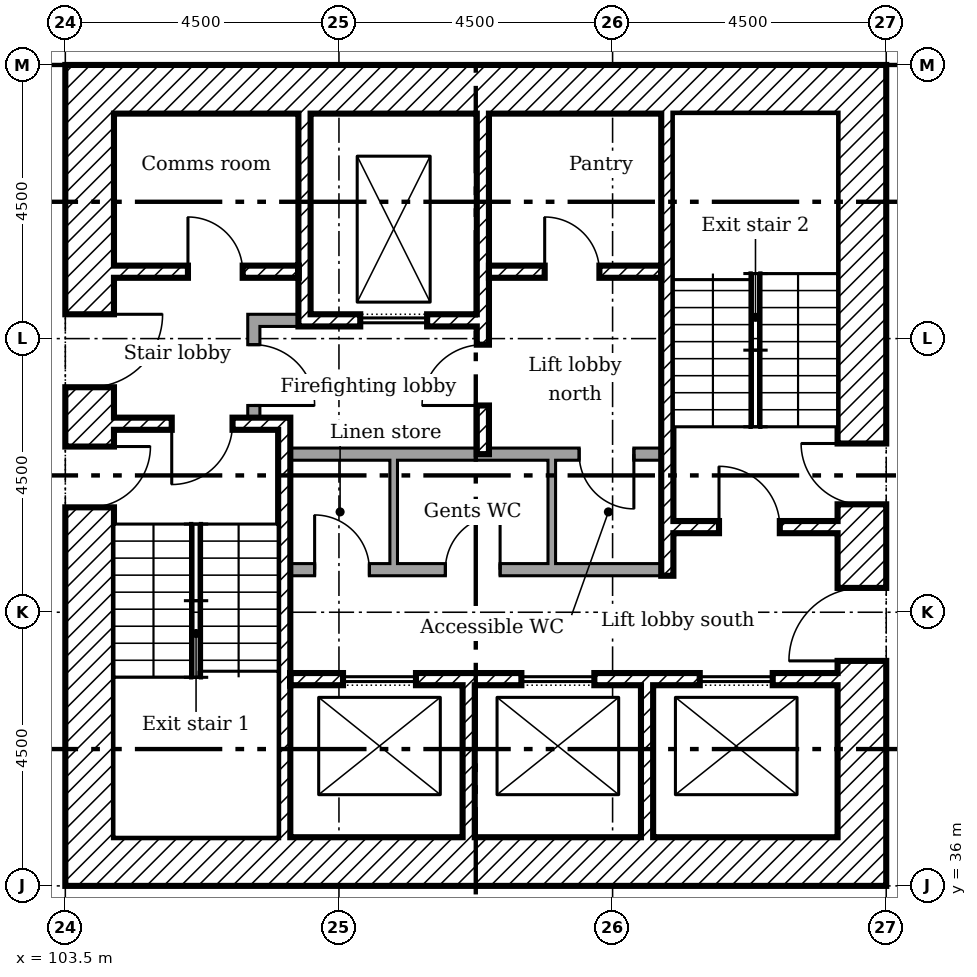
"""IFC4 building model, lengths in metres.
Left out: names, types, materials, properties, quantities, classifications, styles, units other than length and angle.
Written with IfcOpenShell. Run it as: python <this file> out.ifc"""

import sys

from ifc_helpers import new_model, si_unit, direction, frame, frame_2d, origin, place, context, subcontext, project, spatial, rectangle, extrude, element, fill, save


model = new_model("IFC4")
c1 = context("Model", 3, precision=1e-05, world=origin(), true_north=direction((0.0, 1.0)))
c2 = subcontext(c1, "Body", "Model", "MODEL_VIEW")
j1 = project(units=[si_unit("LENGTHUNIT", "METRE"), si_unit("PLANEANGLEUNIT", "RADIAN")], contexts=[c1])
p1 = place(None, origin())
s1 = spatial("IfcSite", under=j1, at=p1, CompositionType="ELEMENT")
p2 = place(p1, origin())
s2 = spatial("IfcBuilding", under=s1, at=p2, CompositionType="ELEMENT")
p3 = place(p2, frame((0.0, 0.0, 72.6)))
s3 = spatial("IfcBuildingStorey", under=s2, at=p3, CompositionType="ELEMENT", Elevation=72.6)
p4 = place(p3, frame((116.6, 36.0, 0.0), z_axis=(0.0, 0.0, 1.0), x_axis=(0.0, 1.0, 0.0)))
e1 = element("IfcWall", 1, at=p4, inside=s3, PredefinedType="SHEAR", context=c2, shape_type="SweptSolid", body=[
    extrude(rectangle(XDim=13.5, YDim=0.8, at=frame_2d((6.75, 0.0))), origin(), (0.0, 0.0, 1.0), 3.35),
])
p5 = place(p4, frame((3.7, 0.0, 0.0)))
e2 = element("IfcOpeningElement", 2, at=p5, cuts=e1, PredefinedType="OPENING", context=c2, shape_type="SweptSolid", body=[
    extrude(rectangle(XDim=1.2, YDim=2.1, at=frame_2d((0.6, 1.05))), frame((0.0, 0.41, 0.0), z_axis=(0.0, -1.0, 0.0), x_axis=(1.0, 0.0, 0.0)), (0.0, 0.0, 1.0), 0.82),
])
p6 = place(p4, frame((6.275, 0.0, 0.0)))
e3 = element("IfcOpeningElement", 3, at=p6, cuts=e1, PredefinedType="OPENING", context=c2, shape_type="SweptSolid", body=[
    extrude(rectangle(XDim=1.0, YDim=2.1, at=frame_2d((0.5, 1.05))), frame((0.0, 0.41, 0.0), z_axis=(0.0, -1.0, 0.0), x_axis=(1.0, 0.0, 0.0)), (0.0, 0.0, 1.0), 0.82),
])
for number, where in (
    (4, (104.3, 49.1, 0.0)),
    (5, (104.3, 36.4, 0.0)),
):
    element("IfcWall", number, at=place(p3, frame(where)), inside=s3, PredefinedType="SHEAR", context=c2, shape_type="SweptSolid", body=[
        extrude(rectangle(XDim=11.9, YDim=0.8, at=frame_2d((5.95, 0.0))), origin(), (0.0, 0.0, 1.0), 3.35),
    ])
p7 = place(p3, frame((103.9, 36.0, 0.0), z_axis=(0.0, 0.0, 1.0), x_axis=(0.0, 1.0, 0.0)))
e6 = element("IfcWall", 6, at=p7, inside=s3, PredefinedType="SHEAR", context=c2, shape_type="SweptSolid", body=[
    extrude(rectangle(XDim=13.5, YDim=0.8, at=frame_2d((6.75, 0.0))), origin(), (0.0, 0.0, 1.0), 3.35),
])
p8 = place(p7, frame((8.2, 0.0, 0.0)))
e7 = element("IfcOpeningElement", 7, at=p8, cuts=e6, PredefinedType="OPENING", context=c2, shape_type="SweptSolid", body=[
    extrude(rectangle(XDim=1.2, YDim=2.1, at=frame_2d((0.6, 1.05))), frame((0.0, 0.41, 0.0), z_axis=(0.0, -1.0, 0.0), x_axis=(1.0, 0.0, 0.0)), (0.0, 0.0, 1.0), 0.82),
])
p9 = place(p7, frame((6.225, 0.0, 0.0)))
e8 = element("IfcOpeningElement", 8, at=p9, cuts=e6, PredefinedType="OPENING", context=c2, shape_type="SweptSolid", body=[
    extrude(rectangle(XDim=1.0, YDim=2.1, at=frame_2d((0.5, 1.05))), frame((0.0, 0.41, 0.0), z_axis=(0.0, -1.0, 0.0), x_axis=(1.0, 0.0, 0.0)), (0.0, 0.0, 1.0), 0.82),
])
p10 = place(p3, frame((107.433, 48.7, 0.0), z_axis=(0.0, 0.0, 1.0), x_axis=(0.0, -1.0, 0.0)))
e9 = element("IfcWall", 9, at=p10, inside=s3, PredefinedType="SHEAR", context=c2, shape_type="SweptSolid", body=[
    extrude(rectangle(XDim=3.5, YDim=0.2, at=frame_2d((1.75, 0.0))), origin(), (0.0, 0.0, 1.0), 3.35),
])
p11 = place(p3, frame((110.367, 48.7, 0.0), z_axis=(0.0, 0.0, 1.0), x_axis=(0.0, -1.0, 0.0)))
e10 = element("IfcWall", 10, at=p11, inside=s3, PredefinedType="SHEAR", context=c2, shape_type="SweptSolid", body=[
    extrude(rectangle(XDim=5.6, YDim=0.2, at=frame_2d((2.8, 0.0))), origin(), (0.0, 0.0, 1.0), 3.35),
])
p12 = place(p11, frame((3.8, 0.0, 0.0)))
e11 = element("IfcOpeningElement", 11, at=p12, cuts=e10, PredefinedType="OPENING", context=c2, shape_type="SweptSolid", body=[
    extrude(rectangle(XDim=1.0, YDim=2.1, at=frame_2d((0.5, 1.05))), frame((0.0, 0.11, 0.0), z_axis=(0.0, -1.0, 0.0), x_axis=(1.0, 0.0, 0.0)), (0.0, 0.0, 1.0), 0.22),
])
for number, where, z_axis, x_axis in (
    (12, (110.133, 36.8, 0.0), (0.0, 0.0, 1.0), (0.0, 1.0, 0.0)),
    (13, (113.067, 36.8, 0.0), (0.0, 0.0, 1.0), (0.0, 1.0, 0.0)),
):
    element("IfcWall", number, at=place(p3, frame(where, z_axis=z_axis, x_axis=x_axis)), inside=s3, PredefinedType="SHEAR", context=c2, shape_type="SweptSolid", body=[
        extrude(rectangle(XDim=2.5, YDim=0.2, at=frame_2d((1.25, 0.0))), origin(), (0.0, 0.0, 1.0), 3.35),
    ])
p13 = place(p3, frame((106.5, 45.3, 0.0)))
e14 = element("IfcWall", 14, at=p13, inside=s3, PredefinedType="PARTITIONING", context=c2, shape_type="SweptSolid", body=[
    extrude(rectangle(XDim=0.833, YDim=0.2, at=frame_2d((0.417, 0.0))), origin(), (0.0, 0.0, 1.0), 3.35),
])
p14 = place(p3, frame((106.6, 43.7, 0.0), z_axis=(0.0, 0.0, 1.0), x_axis=(0.0, 1.0, 0.0)))
e15 = element("IfcWall", 15, at=p14, inside=s3, PredefinedType="PARTITIONING", context=c2, shape_type="SweptSolid", body=[
    extrude(rectangle(XDim=1.5, YDim=0.2, at=frame_2d((0.75, 0.0))), origin(), (0.0, 0.0, 1.0), 3.35),
])
p15 = place(p14, frame((0.2, 0.0, 0.0)))
e16 = element("IfcOpeningElement", 16, at=p15, cuts=e15, PredefinedType="OPENING", context=c2, shape_type="SweptSolid", body=[
    extrude(rectangle(XDim=1.0, YDim=2.1, at=frame_2d((0.5, 1.05))), frame((0.0, 0.11, 0.0), z_axis=(0.0, -1.0, 0.0), x_axis=(1.0, 0.0, 0.0)), (0.0, 0.0, 1.0), 0.22),
])
p16 = place(p3, frame((104.3, 46.1, 0.0)))
e17 = element("IfcWall", 17, at=p16, inside=s3, PredefinedType="SHEAR", context=c2, shape_type="SweptSolid", body=[
    extrude(rectangle(XDim=3.033, YDim=0.2, at=frame_2d((1.517, 0.0))), origin(), (0.0, 0.0, 1.0), 3.35),
])
p17 = place(p16, frame((1.217, 0.0, 0.0)))
e18 = element("IfcOpeningElement", 18, at=p17, cuts=e17, PredefinedType="OPENING", context=c2, shape_type="SweptSolid", body=[
    extrude(rectangle(XDim=0.9, YDim=2.1, at=frame_2d((0.45, 1.05))), frame((0.0, 0.11, 0.0), z_axis=(0.0, -1.0, 0.0), x_axis=(1.0, 0.0, 0.0)), (0.0, 0.0, 1.0), 0.22),
])
p18 = place(p3, frame((110.467, 46.1, 0.0)))
e19 = element("IfcWall", 19, at=p18, inside=s3, PredefinedType="SHEAR", context=c2, shape_type="SweptSolid", body=[
    extrude(rectangle(XDim=2.833, YDim=0.2, at=frame_2d((1.417, 0.0))), origin(), (0.0, 0.0, 1.0), 3.35),
])
p19 = place(p18, frame((0.917, 0.0, 0.0)))
e20 = element("IfcOpeningElement", 20, at=p19, cuts=e19, PredefinedType="OPENING", context=c2, shape_type="SweptSolid", body=[
    extrude(rectangle(XDim=0.9, YDim=2.1, at=frame_2d((0.45, 1.05))), frame((0.0, 0.11, 0.0), z_axis=(0.0, -1.0, 0.0), x_axis=(1.0, 0.0, 0.0)), (0.0, 0.0, 1.0), 0.22),
])
p20 = place(p3, frame((107.533, 45.3, 0.0)))
e21 = element("IfcWall", 21, at=p20, inside=s3, PredefinedType="SHEAR", context=c2, shape_type="SweptSolid", body=[
    extrude(rectangle(XDim=2.733, YDim=0.2, at=frame_2d((1.367, 0.0))), origin(), (0.0, 0.0, 1.0), 3.35),
])
p21 = place(p20, frame((0.817, 0.0, 0.0)))
e22 = element("IfcOpeningElement", 22, at=p21, cuts=e21, PredefinedType="OPENING", context=c2, shape_type="SweptSolid", body=[
    extrude(rectangle(XDim=1.1, YDim=2.1, at=frame_2d((0.55, 1.05))), frame((0.0, 0.11, 0.0), z_axis=(0.0, -1.0, 0.0), x_axis=(1.0, 0.0, 0.0)), (0.0, 0.0, 1.0), 0.22),
])
p22 = place(p3, frame((107.2, 39.4, 0.0)))
e23 = element("IfcWall", 23, at=p22, inside=s3, PredefinedType="SHEAR", context=c2, shape_type="SweptSolid", body=[
    extrude(rectangle(XDim=9.0, YDim=0.2, at=frame_2d((4.5, 0.0))), origin(), (0.0, 0.0, 1.0), 3.35),
])
p23 = place(p22, frame((0.867, 0.0, 0.0)))
e24 = element("IfcOpeningElement", 24, at=p23, cuts=e23, PredefinedType="OPENING", context=c2, shape_type="SweptSolid", body=[
    extrude(rectangle(XDim=1.2, YDim=2.1, at=frame_2d((0.6, 1.05))), frame((0.0, 0.11, 0.0), z_axis=(0.0, -1.0, 0.0), x_axis=(1.0, 0.0, 0.0)), (0.0, 0.0, 1.0), 0.22),
])
p24 = place(p22, frame((3.8, 0.0, 0.0)))
e25 = element("IfcOpeningElement", 25, at=p24, cuts=e23, PredefinedType="OPENING", context=c2, shape_type="SweptSolid", body=[
    extrude(rectangle(XDim=1.2, YDim=2.1, at=frame_2d((0.6, 1.05))), frame((0.0, 0.11, 0.0), z_axis=(0.0, -1.0, 0.0), x_axis=(1.0, 0.0, 0.0)), (0.0, 0.0, 1.0), 0.22),
])
p25 = place(p22, frame((6.733, 0.0, 0.0)))
e26 = element("IfcOpeningElement", 26, at=p25, cuts=e23, PredefinedType="OPENING", context=c2, shape_type="SweptSolid", body=[
    extrude(rectangle(XDim=1.2, YDim=2.1, at=frame_2d((0.6, 1.05))), frame((0.0, 0.11, 0.0), z_axis=(0.0, -1.0, 0.0), x_axis=(1.0, 0.0, 0.0)), (0.0, 0.0, 1.0), 0.22),
])
p26 = place(p3, frame((107.1, 36.8, 0.0), z_axis=(0.0, 0.0, 1.0), x_axis=(0.0, 1.0, 0.0)))
e27 = element("IfcWall", 27, at=p26, inside=s3, PredefinedType="SHEAR", context=c2, shape_type="SweptSolid", body=[
    extrude(rectangle(XDim=6.9, YDim=0.2, at=frame_2d((3.45, 0.0))), origin(), (0.0, 0.0, 1.0), 3.35),
])
p27 = place(p3, frame((104.3, 43.6, 0.0)))
e28 = element("IfcWall", 28, at=p27, inside=s3, PredefinedType="SHEAR", context=c2, shape_type="SweptSolid", body=[
    extrude(rectangle(XDim=2.7, YDim=0.2, at=frame_2d((1.35, 0.0))), origin(), (0.0, 0.0, 1.0), 3.35),
])
p28 = place(p27, frame((0.95, 0.0, 0.0)))
e29 = element("IfcOpeningElement", 29, at=p28, cuts=e28, PredefinedType="OPENING", context=c2, shape_type="SweptSolid", body=[
    extrude(rectangle(XDim=1.0, YDim=2.1, at=frame_2d((0.5, 1.05))), frame((0.0, 0.11, 0.0), z_axis=(0.0, -1.0, 0.0), x_axis=(1.0, 0.0, 0.0)), (0.0, 0.0, 1.0), 0.22),
])
p29 = place(p3, frame((113.5, 41.9, 0.0)))
e30 = element("IfcWall", 30, at=p29, inside=s3, PredefinedType="SHEAR", context=c2, shape_type="SweptSolid", body=[
    extrude(rectangle(XDim=2.7, YDim=0.2, at=frame_2d((1.35, 0.0))), origin(), (0.0, 0.0, 1.0), 3.35),
])
p30 = place(p29, frame((0.75, 0.0, 0.0)))
e31 = element("IfcOpeningElement", 31, at=p30, cuts=e30, PredefinedType="OPENING", context=c2, shape_type="SweptSolid", body=[
    extrude(rectangle(XDim=1.0, YDim=2.1, at=frame_2d((0.5, 1.05))), frame((0.0, 0.11, 0.0), z_axis=(0.0, -1.0, 0.0), x_axis=(1.0, 0.0, 0.0)), (0.0, 0.0, 1.0), 0.22),
])
p31 = place(p3, frame((113.4, 41.1, 0.0), z_axis=(0.0, 0.0, 1.0), x_axis=(0.0, 1.0, 0.0)))
e32 = element("IfcWall", 32, at=p31, inside=s3, PredefinedType="SHEAR", context=c2, shape_type="SweptSolid", body=[
    extrude(rectangle(XDim=7.6, YDim=0.2, at=frame_2d((3.8, 0.0))), origin(), (0.0, 0.0, 1.0), 3.35),
])
p32 = place(p3, frame((107.2, 43.1, 0.0)))
e33 = element("IfcWall", 33, at=p32, inside=s3, PredefinedType="PARTITIONING", context=c2, shape_type="SweptSolid", body=[
    extrude(rectangle(XDim=6.1, YDim=0.2, at=frame_2d((3.05, 0.0))), origin(), (0.0, 0.0, 1.0), 3.35),
])
p33 = place(p32, frame((4.75, 0.0, 0.0)))
e34 = element("IfcOpeningElement", 34, at=p33, cuts=e33, PredefinedType="OPENING", context=c2, shape_type="SweptSolid", body=[
    extrude(rectangle(XDim=0.9, YDim=2.1, at=frame_2d((0.45, 1.05))), frame((0.0, 0.11, 0.0), z_axis=(0.0, -1.0, 0.0), x_axis=(1.0, 0.0, 0.0)), (0.0, 0.0, 1.0), 0.22),
])
p34 = place(p3, frame((107.2, 41.2, 0.0)))
e35 = element("IfcWall", 35, at=p34, inside=s3, PredefinedType="PARTITIONING", context=c2, shape_type="SweptSolid", body=[
    extrude(rectangle(XDim=6.1, YDim=0.2, at=frame_2d((3.05, 0.0))), origin(), (0.0, 0.0, 1.0), 3.35),
])
p35 = place(p34, frame((0.4, 0.0, 0.0)))
e36 = element("IfcOpeningElement", 36, at=p35, cuts=e35, PredefinedType="OPENING", context=c2, shape_type="SweptSolid", body=[
    extrude(rectangle(XDim=0.9, YDim=2.1, at=frame_2d((0.45, 1.05))), frame((0.0, 0.11, 0.0), z_axis=(0.0, -1.0, 0.0), x_axis=(1.0, 0.0, 0.0)), (0.0, 0.0, 1.0), 0.22),
])
p36 = place(p34, frame((2.55, 0.0, 0.0)))
e37 = element("IfcOpeningElement", 37, at=p36, cuts=e35, PredefinedType="OPENING", context=c2, shape_type="SweptSolid", body=[
    extrude(rectangle(XDim=0.9, YDim=2.1, at=frame_2d((0.45, 1.05))), frame((0.0, 0.11, 0.0), z_axis=(0.0, -1.0, 0.0), x_axis=(1.0, 0.0, 0.0)), (0.0, 0.0, 1.0), 0.22),
])
for number, where, z_axis, x_axis in (
    (38, (108.9, 41.3, 0.0), (0.0, 0.0, 1.0), (0.0, 1.0, 0.0)),
    (39, (111.5, 41.3, 0.0), (0.0, 0.0, 1.0), (0.0, 1.0, 0.0)),
):
    element("IfcWall", number, at=place(p3, frame(where, z_axis=z_axis, x_axis=x_axis)), inside=s3, PredefinedType="PARTITIONING", context=c2, shape_type="SweptSolid", body=[
        extrude(rectangle(XDim=1.7, YDim=0.125, at=frame_2d((0.85, 0.0))), origin(), (0.0, 0.0, 1.0), 3.35),
    ])
p37 = place(p8, frame((1.2, 0.0, 0.0), x_axis=(-1.0, 0.0, 0.0)))
e40 = element("IfcDoor", 40, at=p37, inside=s3, OperationType="SINGLE_SWING_RIGHT", PredefinedType="DOOR", context=c2, shape_type="SweptSolid", body=[
    extrude(rectangle(XDim=1.2, YDim=2.1, at=frame_2d((0.6, 1.05))), frame((0.0, 0.025, 0.0), z_axis=(0.0, -1.0, 0.0), x_axis=(1.0, 0.0, 0.0)), (0.0, 0.0, 1.0), 0.05),
])
fill(e7, e40)
p38 = place(p5, origin())
e41 = element("IfcDoor", 41, at=p38, inside=s3, OperationType="SINGLE_SWING_RIGHT", PredefinedType="DOOR", context=c2, shape_type="SweptSolid", body=[
    extrude(rectangle(XDim=1.2, YDim=2.1, at=frame_2d((0.6, 1.05))), frame((0.0, 0.025, 0.0), z_axis=(0.0, -1.0, 0.0), x_axis=(1.0, 0.0, 0.0)), (0.0, 0.0, 1.0), 0.05),
])
fill(e2, e41)
p39 = place(p28, frame((1.0, 0.0, 0.0), x_axis=(-1.0, 0.0, 0.0)))
e42 = element("IfcDoor", 42, at=p39, inside=s3, OperationType="SINGLE_SWING_LEFT", PredefinedType="DOOR", context=c2, shape_type="SweptSolid", body=[
    extrude(rectangle(XDim=1.0, YDim=2.1, at=frame_2d((0.5, 1.05))), frame((0.0, 0.025, 0.0), z_axis=(0.0, -1.0, 0.0), x_axis=(1.0, 0.0, 0.0)), (0.0, 0.0, 1.0), 0.05),
])
fill(e29, e42)
p40 = place(p9, frame((1.0, 0.0, 0.0), x_axis=(-1.0, 0.0, 0.0)))
e43 = element("IfcDoor", 43, at=p40, inside=s3, OperationType="SINGLE_SWING_RIGHT", PredefinedType="DOOR", context=c2, shape_type="SweptSolid", body=[
    extrude(rectangle(XDim=1.0, YDim=2.1, at=frame_2d((0.5, 1.05))), frame((0.0, 0.025, 0.0), z_axis=(0.0, -1.0, 0.0), x_axis=(1.0, 0.0, 0.0)), (0.0, 0.0, 1.0), 0.05),
])
fill(e8, e43)
p41 = place(p30, origin())
e44 = element("IfcDoor", 44, at=p41, inside=s3, OperationType="SINGLE_SWING_RIGHT", PredefinedType="DOOR", context=c2, shape_type="SweptSolid", body=[
    extrude(rectangle(XDim=1.0, YDim=2.1, at=frame_2d((0.5, 1.05))), frame((0.0, 0.025, 0.0), z_axis=(0.0, -1.0, 0.0), x_axis=(1.0, 0.0, 0.0)), (0.0, 0.0, 1.0), 0.05),
])
fill(e31, e44)
p42 = place(p6, origin())
e45 = element("IfcDoor", 45, at=p42, inside=s3, OperationType="SINGLE_SWING_LEFT", PredefinedType="DOOR", context=c2, shape_type="SweptSolid", body=[
    extrude(rectangle(XDim=1.0, YDim=2.1, at=frame_2d((0.5, 1.05))), frame((0.0, 0.025, 0.0), z_axis=(0.0, -1.0, 0.0), x_axis=(1.0, 0.0, 0.0)), (0.0, 0.0, 1.0), 0.05),
])
fill(e3, e45)
p43 = place(p12, frame((1.0, 0.0, 0.0), x_axis=(-1.0, 0.0, 0.0)))
e46 = element("IfcDoor", 46, at=p43, inside=s3, OperationType="SINGLE_SWING_RIGHT", PredefinedType="DOOR", context=c2, shape_type="SweptSolid", body=[
    extrude(rectangle(XDim=1.0, YDim=2.1, at=frame_2d((0.5, 1.05))), frame((0.0, 0.025, 0.0), z_axis=(0.0, -1.0, 0.0), x_axis=(1.0, 0.0, 0.0)), (0.0, 0.0, 1.0), 0.05),
])
fill(e11, e46)
p44 = place(p15, frame((1.0, 0.0, 0.0), x_axis=(-1.0, 0.0, 0.0)))
e47 = element("IfcDoor", 47, at=p44, inside=s3, OperationType="SINGLE_SWING_LEFT", PredefinedType="DOOR", context=c2, shape_type="SweptSolid", body=[
    extrude(rectangle(XDim=1.0, YDim=2.1, at=frame_2d((0.5, 1.05))), frame((0.0, 0.025, 0.0), z_axis=(0.0, -1.0, 0.0), x_axis=(1.0, 0.0, 0.0)), (0.0, 0.0, 1.0), 0.05),
])
fill(e16, e47)
p45 = place(p17, origin())
e48 = element("IfcDoor", 48, at=p45, inside=s3, OperationType="SINGLE_SWING_RIGHT", PredefinedType="DOOR", context=c2, shape_type="SweptSolid", body=[
    extrude(rectangle(XDim=0.9, YDim=2.1, at=frame_2d((0.45, 1.05))), frame((0.0, 0.025, 0.0), z_axis=(0.0, -1.0, 0.0), x_axis=(1.0, 0.0, 0.0)), (0.0, 0.0, 1.0), 0.05),
])
fill(e18, e48)
p46 = place(p19, origin())
e49 = element("IfcDoor", 49, at=p46, inside=s3, OperationType="SINGLE_SWING_RIGHT", PredefinedType="DOOR", context=c2, shape_type="SweptSolid", body=[
    extrude(rectangle(XDim=0.9, YDim=2.1, at=frame_2d((0.45, 1.05))), frame((0.0, 0.025, 0.0), z_axis=(0.0, -1.0, 0.0), x_axis=(1.0, 0.0, 0.0)), (0.0, 0.0, 1.0), 0.05),
])
fill(e20, e49)
p47 = place(p35, origin())
e50 = element("IfcDoor", 50, at=p47, inside=s3, OperationType="SINGLE_SWING_RIGHT", PredefinedType="DOOR", context=c2, shape_type="SweptSolid", body=[
    extrude(rectangle(XDim=0.9, YDim=2.1, at=frame_2d((0.45, 1.05))), frame((0.0, 0.025, 0.0), z_axis=(0.0, -1.0, 0.0), x_axis=(1.0, 0.0, 0.0)), (0.0, 0.0, 1.0), 0.05),
])
fill(e36, e50)
p48 = place(p36, origin())
e51 = element("IfcDoor", 51, at=p48, inside=s3, OperationType="SINGLE_SWING_LEFT", PredefinedType="DOOR", context=c2, shape_type="SweptSolid", body=[
    extrude(rectangle(XDim=0.9, YDim=2.1, at=frame_2d((0.45, 1.05))), frame((0.0, 0.025, 0.0), z_axis=(0.0, -1.0, 0.0), x_axis=(1.0, 0.0, 0.0)), (0.0, 0.0, 1.0), 0.05),
])
fill(e37, e51)
p49 = place(p33, frame((0.9, 0.0, 0.0), x_axis=(-1.0, 0.0, 0.0)))
e52 = element("IfcDoor", 52, at=p49, inside=s3, OperationType="SINGLE_SWING_RIGHT", PredefinedType="DOOR", context=c2, shape_type="SweptSolid", body=[
    extrude(rectangle(XDim=0.9, YDim=2.1, at=frame_2d((0.45, 1.05))), frame((0.0, 0.025, 0.0), z_axis=(0.0, -1.0, 0.0), x_axis=(1.0, 0.0, 0.0)), (0.0, 0.0, 1.0), 0.05),
])
fill(e34, e52)
p50 = place(p21, origin())
e53 = element("IfcDoor", 53, at=p50, inside=s3, OperationType="SLIDING_TO_LEFT", PredefinedType="DOOR", context=c2, shape_type="SweptSolid", body=[
    extrude(rectangle(XDim=1.1, YDim=2.1, at=frame_2d((0.55, 1.05))), frame((0.0, 0.025, 0.0), z_axis=(0.0, -1.0, 0.0), x_axis=(1.0, 0.0, 0.0)), (0.0, 0.0, 1.0), 0.05),
])
fill(e22, e53)
p51 = place(p23, origin())
e54 = element("IfcDoor", 54, at=p51, inside=s3, OperationType="SLIDING_TO_LEFT", PredefinedType="DOOR", context=c2, shape_type="SweptSolid", body=[
    extrude(rectangle(XDim=1.2, YDim=2.1, at=frame_2d((0.6, 1.05))), frame((0.0, 0.025, 0.0), z_axis=(0.0, -1.0, 0.0), x_axis=(1.0, 0.0, 0.0)), (0.0, 0.0, 1.0), 0.05),
])
fill(e24, e54)
p52 = place(p24, origin())
e55 = element("IfcDoor", 55, at=p52, inside=s3, OperationType="SLIDING_TO_LEFT", PredefinedType="DOOR", context=c2, shape_type="SweptSolid", body=[
    extrude(rectangle(XDim=1.2, YDim=2.1, at=frame_2d((0.6, 1.05))), frame((0.0, 0.025, 0.0), z_axis=(0.0, -1.0, 0.0), x_axis=(1.0, 0.0, 0.0)), (0.0, 0.0, 1.0), 0.05),
])
fill(e25, e55)
p53 = place(p25, origin())
e56 = element("IfcDoor", 56, at=p53, inside=s3, OperationType="SLIDING_TO_LEFT", PredefinedType="DOOR", context=c2, shape_type="SweptSolid", body=[
    extrude(rectangle(XDim=1.2, YDim=2.1, at=frame_2d((0.6, 1.05))), frame((0.0, 0.025, 0.0), z_axis=(0.0, -1.0, 0.0), x_axis=(1.0, 0.0, 0.0)), (0.0, 0.0, 1.0), 0.05),
])
fill(e26, e56)
save(model, sys.argv[1])
